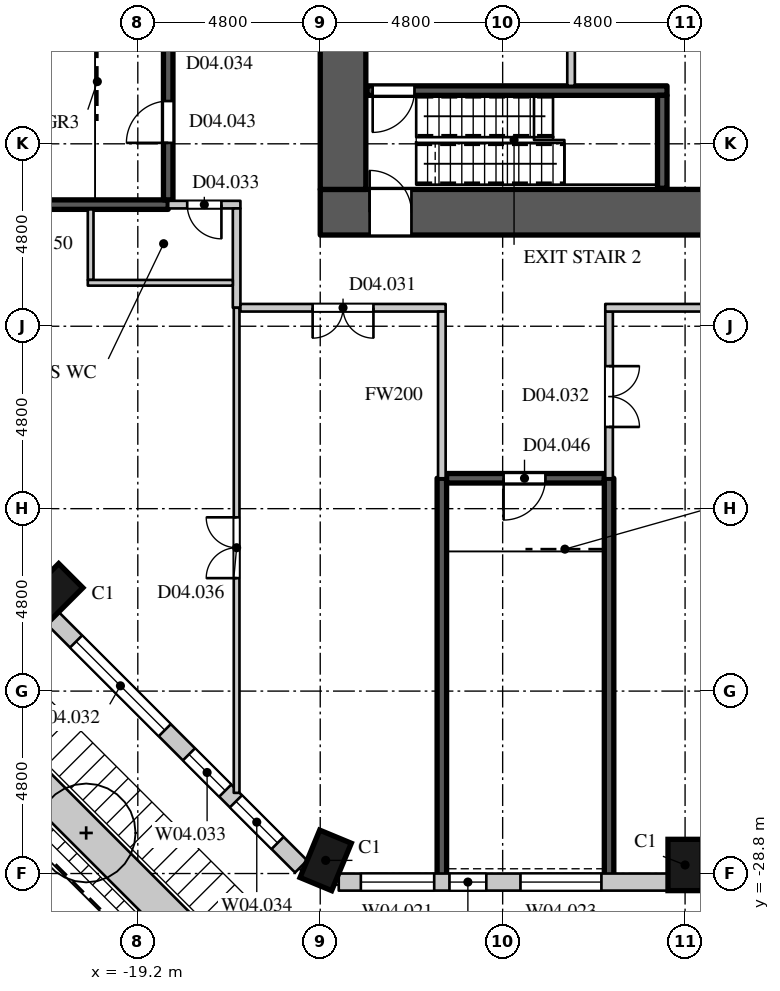
"""IFC4 building model, lengths in metres.
Left out: names, types, materials, properties, quantities, classifications, styles, units other than length and angle.
Written with IfcOpenShell. Run it as: python <this file> out.ifc"""

import sys

from ifc_helpers import new_model, si_unit, direction, frame, frame_2d, origin, origin_2d, place, context, subcontext, project, spatial, rectangle, extrude, element, fill, save


model = new_model("IFC4")
c1 = context("Model", 3, precision=1e-05, world=origin(), true_north=direction((0.0, 1.0)))
c2 = subcontext(c1, "Body", "Model", "MODEL_VIEW")
j1 = project(units=[si_unit("LENGTHUNIT", "METRE"), si_unit("PLANEANGLEUNIT", "RADIAN")], contexts=[c1])
p1 = place(None, origin())
s1 = spatial("IfcSite", under=j1, at=p1, CompositionType="ELEMENT")
p2 = place(p1, origin())
s2 = spatial("IfcBuilding", under=s1, at=p2, CompositionType="ELEMENT")
p3 = place(p2, frame((0.0, 0.0, 21.0)))
s3 = spatial("IfcBuildingStorey", under=s2, at=p3, CompositionType="ELEMENT", Elevation=21.0)
for number, where, z_axis, x_axis in (
    (1, (-21.441, -21.441, 0.0), (0.0, 0.0, 1.0), (0.707, -0.707, 0.0)),
    (2, (-14.257, -28.454, 0.0), (0.0, 0.0, 1.0), (0.924, -0.383, 0.0)),
    (3, (-4.8, -28.575, 0.0), (0.0, 0.0, 1.0), (1.0, 0.0, 0.0)),
):
    element("IfcColumn", number, at=place(p3, frame(where, z_axis=z_axis, x_axis=x_axis)), inside=s3, PredefinedType="COLUMN", context=c2, shape_type="SweptSolid", body=[
        extrude(rectangle(XDim=0.9, YDim=1.35, at=origin_2d()), origin(), (0.0, 0.0, 1.0), 4.5),
    ])
p4 = place(p3, frame((-21.441, -22.077, 0.9), z_axis=(0.0, 0.0, 1.0), x_axis=(0.707106781187, -0.707106781187, 0.0)))
e4 = element("IfcWall", 4, at=p4, inside=s3, PredefinedType="ELEMENTEDWALL", context=c2, shape_type="SweptSolid", body=[
    extrude(rectangle(XDim=9.245, YDim=0.45, at=frame_2d((4.623, 0.0))), origin(), (0.0, 0.0, 1.0), 3.3),
])
p5 = place(p4, frame((0.873, 0.0, 0.15)))
e5 = element("IfcOpeningElement", 5, at=p5, cuts=e4, PredefinedType="OPENING", context=c2, shape_type="SweptSolid", body=[
    extrude(rectangle(XDim=3.3, YDim=2.7, at=frame_2d((1.65, 1.35))), frame((0.0, 0.235, 0.0), z_axis=(0.0, -1.0, 0.0), x_axis=(1.0, 0.0, 0.0)), (0.0, 0.0, 1.0), 0.47),
])
p6 = place(p4, frame((5.073, 0.0, 0.15)))
e6 = element("IfcOpeningElement", 6, at=p6, cuts=e4, PredefinedType="OPENING", context=c2, shape_type="SweptSolid", body=[
    extrude(rectangle(XDim=1.35, YDim=2.7, at=frame_2d((0.675, 1.35))), frame((0.0, 0.235, 0.0), z_axis=(0.0, -1.0, 0.0), x_axis=(1.0, 0.0, 0.0)), (0.0, 0.0, 1.0), 0.47),
])
p7 = place(p4, frame((6.821, 0.0, 0.15)))
e7 = element("IfcOpeningElement", 7, at=p7, cuts=e4, PredefinedType="OPENING", context=c2, shape_type="SweptSolid", body=[
    extrude(rectangle(XDim=1.55, YDim=2.7, at=frame_2d((0.775, 1.35))), frame((0.0, 0.235, 0.0), z_axis=(0.0, -1.0, 0.0), x_axis=(1.0, 0.0, 0.0)), (0.0, 0.0, 1.0), 0.47),
])
p8 = place(p3, frame((-13.913, -29.025, 0.9), z_axis=(0.0, 0.0, 1.0), x_axis=(1.0, 0.0, 0.0)))
e8 = element("IfcWall", 8, at=p8, inside=s3, PredefinedType="ELEMENTEDWALL", context=c2, shape_type="SweptSolid", body=[
    extrude(rectangle(XDim=8.663, YDim=0.45, at=frame_2d((4.332, 0.0))), origin(), (0.0, 0.0, 1.0), 3.3),
])
p9 = place(p8, frame((0.582, 0.0, 0.15)))
e9 = element("IfcOpeningElement", 9, at=p9, cuts=e8, PredefinedType="OPENING", context=c2, shape_type="SweptSolid", body=[
    extrude(rectangle(XDim=1.93, YDim=2.7, at=frame_2d((0.965, 1.35))), frame((0.0, 0.235, 0.0), z_axis=(0.0, -1.0, 0.0), x_axis=(1.0, 0.0, 0.0)), (0.0, 0.0, 1.0), 0.47),
])
p10 = place(p8, frame((2.913, 0.0, 0.15)))
e10 = element("IfcOpeningElement", 10, at=p10, cuts=e8, PredefinedType="OPENING", context=c2, shape_type="SweptSolid", body=[
    extrude(rectangle(XDim=0.97, YDim=2.7, at=frame_2d((0.485, 1.35))), frame((0.0, 0.235, 0.0), z_axis=(0.0, -1.0, 0.0), x_axis=(1.0, 0.0, 0.0)), (0.0, 0.0, 1.0), 0.47),
])
p11 = place(p8, frame((4.781, 0.0, 0.15)))
e11 = element("IfcOpeningElement", 11, at=p11, cuts=e8, PredefinedType="OPENING", context=c2, shape_type="SweptSolid", body=[
    extrude(rectangle(XDim=2.13, YDim=2.7, at=frame_2d((1.065, 1.35))), frame((0.0, 0.235, 0.0), z_axis=(0.0, -1.0, 0.0), x_axis=(1.0, 0.0, 0.0)), (0.0, 0.0, 1.0), 0.47),
])
p12 = place(p3, frame((-23.191, -25.1, 0.0), z_axis=(0.0, 0.0, 1.0), x_axis=(0.707090385078, -0.707123176915, 0.0)))
e12 = element("IfcWall", 12, at=p12, inside=s3, PredefinedType="USERDEFINED", context=c2, shape_type="SweptSolid", body=[
    extrude(rectangle(XDim=7.445, YDim=0.9, at=frame_2d((3.723, 0.0))), origin(), (0.0, 0.0, 1.0), 0.9),
])
p13 = place(p3, frame((-14.4, -11.4, 0.0), z_axis=(0.0, 0.0, 1.0), x_axis=(1.0, 0.0, 0.0)))
e13 = element("IfcWall", 13, at=p13, inside=s3, PredefinedType="SHEAR", context=c2, shape_type="SweptSolid", body=[
    extrude(rectangle(XDim=28.8, YDim=1.2, at=frame_2d((14.4, 0.0))), origin(), (0.0, 0.0, 1.0), 4.5),
])
p14 = place(p13, frame((1.3, 0.0, 0.0)))
e14 = element("IfcOpeningElement", 14, at=p14, cuts=e13, PredefinedType="OPENING", context=c2, shape_type="SweptSolid", body=[
    extrude(rectangle(XDim=1.1, YDim=2.2, at=frame_2d((0.55, 1.1))), frame((0.0, 0.61, 0.0), z_axis=(0.0, -1.0, 0.0), x_axis=(1.0, 0.0, 0.0)), (0.0, 0.0, 1.0), 1.22),
])
p15 = place(p13, frame((26.4, 0.0, 0.0)))
e15 = element("IfcOpeningElement", 15, at=p15, cuts=e13, PredefinedType="OPENING", context=c2, shape_type="SweptSolid", body=[
    extrude(rectangle(XDim=1.1, YDim=2.2, at=frame_2d((0.55, 1.1))), frame((0.0, 0.61, 0.0), z_axis=(0.0, -1.0, 0.0), x_axis=(1.0, 0.0, 0.0)), (0.0, 0.0, 1.0), 1.22),
])
p16 = place(p3, frame((-13.8, -10.8, 0.0), z_axis=(0.0, 0.0, 1.0), x_axis=(0.0, 1.0, 0.0)))
e16 = element("IfcWall", 16, at=p16, inside=s3, PredefinedType="SHEAR", context=c2, shape_type="SweptSolid", body=[
    extrude(rectangle(XDim=21.6, YDim=1.2, at=frame_2d((10.8, 0.0))), origin(), (0.0, 0.0, 1.0), 4.5),
])
p17 = place(p16, frame((15.5, 0.0, 0.0)))
e17 = element("IfcOpeningElement", 17, at=p17, cuts=e16, PredefinedType="OPENING", context=c2, shape_type="SweptSolid", body=[
    extrude(rectangle(XDim=1.5, YDim=2.4, at=frame_2d((0.75, 1.2))), frame((0.0, 0.61, 0.0), z_axis=(0.0, -1.0, 0.0), x_axis=(1.0, 0.0, 0.0)), (0.0, 0.0, 1.0), 1.22),
])
p18 = place(p16, frame((4.5, 0.0, 0.0)))
e18 = element("IfcOpeningElement", 18, at=p18, cuts=e16, PredefinedType="OPENING", context=c2, shape_type="SweptSolid", body=[
    extrude(rectangle(XDim=1.5, YDim=2.4, at=frame_2d((0.75, 1.2))), frame((0.0, 0.61, 0.0), z_axis=(0.0, -1.0, 0.0), x_axis=(1.0, 0.0, 0.0)), (0.0, 0.0, 1.0), 1.22),
])
p19 = place(p3, frame((-18.4, -11.2, 0.0), z_axis=(0.0, 0.0, 1.0), x_axis=(1.0, 0.0, 0.0)))
e19 = element("IfcWall", 19, at=p19, inside=s3, PredefinedType="PARTITIONING", context=c2, shape_type="SweptSolid", body=[
    extrude(rectangle(XDim=1.9, YDim=0.2, at=frame_2d((0.95, 0.0))), origin(), (0.0, 0.0, 1.0), 3.55),
])
p20 = place(p19, frame((0.5, 0.0, 0.0)))
e20 = element("IfcOpeningElement", 20, at=p20, cuts=e19, PredefinedType="OPENING", context=c2, shape_type="SweptSolid", body=[
    extrude(rectangle(XDim=0.9, YDim=2.2, at=frame_2d((0.45, 1.1))), frame((0.0, 0.11, 0.0), z_axis=(0.0, -1.0, 0.0), x_axis=(1.0, 0.0, 0.0)), (0.0, 0.0, 1.0), 0.22),
])
p21 = place(p3, frame((-16.6, -13.914, 0.0), z_axis=(0.0, 0.0, 1.0), x_axis=(0.0, 1.0, 0.0)))
e21 = element("IfcWall", 21, at=p21, inside=s3, PredefinedType="PARTITIONING", context=c2, shape_type="SweptSolid", body=[
    extrude(rectangle(XDim=2.614, YDim=0.2, at=frame_2d((1.307, 0.0))), origin(), (0.0, 0.0, 1.0), 4.25),
])
p22 = place(p3, frame((-16.5, -13.914, 0.0), z_axis=(0.0, 0.0, 1.0), x_axis=(1.0, 0.0, 0.0)))
e22 = element("IfcWall", 22, at=p22, inside=s3, PredefinedType="PARTITIONING", context=c2, shape_type="SweptSolid", body=[
    extrude(rectangle(XDim=5.4, YDim=0.2, at=frame_2d((2.7, 0.0))), origin(), (0.0, 0.0, 1.0), 4.25),
])
p23 = place(p22, frame((1.9, 0.0, 0.0)))
e23 = element("IfcOpeningElement", 23, at=p23, cuts=e22, PredefinedType="OPENING", context=c2, shape_type="SweptSolid", body=[
    extrude(rectangle(XDim=1.6, YDim=2.4, at=frame_2d((0.8, 1.2))), frame((0.0, 0.11, 0.0), z_axis=(0.0, -1.0, 0.0), x_axis=(1.0, 0.0, 0.0)), (0.0, 0.0, 1.0), 0.22),
])
p24 = place(p3, frame((-11.2, -18.4, 0.0), z_axis=(0.0, 0.0, 1.0), x_axis=(0.0, 1.0, 0.0)))
e24 = element("IfcWall", 24, at=p24, inside=s3, PredefinedType="PARTITIONING", context=c2, shape_type="SweptSolid", body=[
    extrude(rectangle(XDim=4.386, YDim=0.2, at=frame_2d((2.193, 0.0))), origin(), (0.0, 0.0, 1.0), 4.25),
])
p25 = place(p3, frame((-6.8, -18.4, 0.0), z_axis=(0.0, 0.0, 1.0), x_axis=(0.0, 1.0, 0.0)))
e25 = element("IfcWall", 25, at=p25, inside=s3, PredefinedType="PARTITIONING", context=c2, shape_type="SweptSolid", body=[
    extrude(rectangle(XDim=4.386, YDim=0.2, at=frame_2d((2.193, 0.0))), origin(), (0.0, 0.0, 1.0), 4.25),
])
p26 = place(p25, frame((1.35, 0.0, 0.0)))
e26 = element("IfcOpeningElement", 26, at=p26, cuts=e25, PredefinedType="OPENING", context=c2, shape_type="SweptSolid", body=[
    extrude(rectangle(XDim=1.6, YDim=2.4, at=frame_2d((0.8, 1.2))), frame((0.0, 0.11, 0.0), z_axis=(0.0, -1.0, 0.0), x_axis=(1.0, 0.0, 0.0)), (0.0, 0.0, 1.0), 0.22),
])
p27 = place(p3, frame((-6.9, -13.914, 0.0), z_axis=(0.0, 0.0, 1.0), x_axis=(1.0, 0.0, 0.0)))
e27 = element("IfcWall", 27, at=p27, inside=s3, PredefinedType="PARTITIONING", context=c2, shape_type="SweptSolid", body=[
    extrude(rectangle(XDim=13.8, YDim=0.2, at=frame_2d((6.9, 0.0))), origin(), (0.0, 0.0, 1.0), 4.25),
])
p28 = place(p3, frame((-20.441, -13.182, 0.0), z_axis=(0.0, 0.0, 1.0), x_axis=(0.0, 1.0, 0.0)))
e28 = element("IfcWall", 28, at=p28, inside=s3, PredefinedType="PARTITIONING", context=c2, shape_type="SweptSolid", body=[
    extrude(rectangle(XDim=1.857, YDim=0.15, at=frame_2d((0.928, 0.0))), origin(), (0.0, 0.0, 1.0), 4.25),
])
p29 = place(p3, frame((-20.516, -13.257, 0.0), z_axis=(0.0, 0.0, 1.0), x_axis=(1.0, 0.0, 0.0)))
e29 = element("IfcWall", 29, at=p29, inside=s3, PredefinedType="PARTITIONING", context=c2, shape_type="SweptSolid", body=[
    extrude(rectangle(XDim=3.816, YDim=0.15, at=frame_2d((1.908, 0.0))), origin(), (0.0, 0.0, 1.0), 4.25),
])
p30 = place(p3, frame((-16.6, -26.678, 0.0), z_axis=(0.0, 0.0, 1.0), x_axis=(0.0, 1.0, 0.0)))
e30 = element("IfcWall", 30, at=p30, inside=s3, PredefinedType="PARTITIONING", context=c2, shape_type="SweptSolid", body=[
    extrude(rectangle(XDim=12.764, YDim=0.15, at=frame_2d((6.382, 0.0))), origin(), (0.0, 0.0, 1.0), 4.25),
])
p31 = place(p30, frame((5.65, 0.0, 0.0)))
e31 = element("IfcOpeningElement", 31, at=p31, cuts=e30, PredefinedType="OPENING", context=c2, shape_type="SweptSolid", body=[
    extrude(rectangle(XDim=1.6, YDim=2.4, at=frame_2d((0.8, 1.2))), frame((0.0, 0.085, 0.0), z_axis=(0.0, -1.0, 0.0), x_axis=(1.0, 0.0, 0.0)), (0.0, 0.0, 1.0), 0.17),
])
p32 = place(p3, frame((-7.8, -8.075, 0.0), z_axis=(0.0, 0.0, 1.0), x_axis=(0.0, 1.0, 0.0)))
e32 = element("IfcWall", 32, at=p32, inside=s3, PredefinedType="PARTITIONING", context=c2, shape_type="SweptSolid", body=[
    extrude(rectangle(XDim=2.275, YDim=0.2, at=frame_2d((1.137, 0.0))), origin(), (0.0, 0.0, 1.0), 4.25),
])
p33 = place(p3, frame((-28.855, -11.2, 0.0), z_axis=(0.0, 0.0, 1.0), x_axis=(1.0, 0.0, 0.0)))
e33 = element("IfcWall", 33, at=p33, inside=s3, PredefinedType="SHEAR", context=c2, shape_type="SweptSolid", body=[
    extrude(rectangle(XDim=10.455, YDim=0.25, at=frame_2d((5.228, 0.0))), origin(), (0.0, 0.0, 1.0), 4.25),
])
p34 = place(p3, frame((-18.4, -11.075, 0.0), z_axis=(0.0, 0.0, 1.0), x_axis=(0.0, 1.0, 0.0)))
e34 = element("IfcWall", 34, at=p34, inside=s3, PredefinedType="SHEAR", context=c2, shape_type="SweptSolid", body=[
    extrude(rectangle(XDim=4.15, YDim=0.25, at=frame_2d((2.075, 0.0))), origin(), (0.0, 0.0, 1.0), 4.25),
])
p35 = place(p34, frame((1.5, 0.0, 0.0)))
e35 = element("IfcOpeningElement", 35, at=p35, cuts=e34, PredefinedType="OPENING", context=c2, shape_type="SweptSolid", body=[
    extrude(rectangle(XDim=1.1, YDim=2.2, at=frame_2d((0.55, 1.1))), frame((0.0, 0.135, 0.0), z_axis=(0.0, -1.0, 0.0), x_axis=(1.0, 0.0, 0.0)), (0.0, 0.0, 1.0), 0.27),
])
p36 = place(p3, frame((-13.17, -8.2, 0.0), z_axis=(0.0, 0.0, 1.0), x_axis=(1.0, 0.0, 0.0)))
e36 = element("IfcWall", 36, at=p36, inside=s3, PredefinedType="SHEAR", context=c2, shape_type="SweptSolid", body=[
    extrude(rectangle(XDim=7.895, YDim=0.25, at=frame_2d((3.948, 0.0))), origin(), (0.0, 0.0, 1.0), 4.25),
])
p37 = place(p36, frame((0.15, 0.0, 0.0)))
e37 = element("IfcOpeningElement", 37, at=p37, cuts=e36, PredefinedType="OPENING", context=c2, shape_type="SweptSolid", body=[
    extrude(rectangle(XDim=1.1, YDim=2.2, at=frame_2d((0.55, 1.1))), frame((0.0, 0.135, 0.0), z_axis=(0.0, -1.0, 0.0), x_axis=(1.0, 0.0, 0.0)), (0.0, 0.0, 1.0), 0.27),
])
p38 = place(p3, frame((-11.2, -28.855, 0.0), z_axis=(0.0, 0.0, 1.0), x_axis=(0.0, 1.0, 0.0)))
e38 = element("IfcWall", 38, at=p38, inside=s3, PredefinedType="SHEAR", context=c2, shape_type="SweptSolid", body=[
    extrude(rectangle(XDim=10.455, YDim=0.25, at=frame_2d((5.228, 0.0))), origin(), (0.0, 0.0, 1.0), 4.25),
])
p39 = place(p3, frame((-11.075, -18.4, 0.0), z_axis=(0.0, 0.0, 1.0), x_axis=(1.0, 0.0, 0.0)))
e39 = element("IfcWall", 39, at=p39, inside=s3, PredefinedType="SHEAR", context=c2, shape_type="SweptSolid", body=[
    extrude(rectangle(XDim=4.15, YDim=0.25, at=frame_2d((2.075, 0.0))), origin(), (0.0, 0.0, 1.0), 4.25),
])
p40 = place(p39, frame((1.5, 0.0, 0.0)))
e40 = element("IfcOpeningElement", 40, at=p40, cuts=e39, PredefinedType="OPENING", context=c2, shape_type="SweptSolid", body=[
    extrude(rectangle(XDim=1.1, YDim=2.2, at=frame_2d((0.55, 1.1))), frame((0.0, 0.135, 0.0), z_axis=(0.0, -1.0, 0.0), x_axis=(1.0, 0.0, 0.0)), (0.0, 0.0, 1.0), 0.27),
])
p41 = place(p3, frame((-6.8, -28.855, 0.0), z_axis=(0.0, 0.0, 1.0), x_axis=(0.0, 1.0, 0.0)))
e41 = element("IfcWall", 41, at=p41, inside=s3, PredefinedType="SHEAR", context=c2, shape_type="SweptSolid", body=[
    extrude(rectangle(XDim=10.455, YDim=0.25, at=frame_2d((5.228, 0.0))), origin(), (0.0, 0.0, 1.0), 4.25),
])
p42 = place(p3, frame((-5.4, -10.77, 0.0), z_axis=(0.0, 0.0, 1.0), x_axis=(0.0, 1.0, 0.0)))
e42 = element("IfcWall", 42, at=p42, inside=s3, PredefinedType="SHEAR", context=c2, shape_type="SweptSolid", body=[
    extrude(rectangle(XDim=2.445, YDim=0.25, at=frame_2d((1.223, 0.0))), origin(), (0.0, 0.0, 1.0), 4.25),
])
p43 = place(p5, origin())
e43 = element("IfcWindow", 43, at=p43, inside=s3, PartitioningType="SINGLE_PANEL", PredefinedType="WINDOW", context=c2, shape_type="SweptSolid", body=[
    extrude(rectangle(XDim=3.3, YDim=2.7, at=frame_2d((1.65, 1.35))), frame((0.0, 0.135, 0.0), z_axis=(0.0, -1.0, 0.0), x_axis=(1.0, 0.0, 0.0)), (0.0, 0.0, 1.0), 0.06),
])
fill(e5, e43)
p44 = place(p6, origin())
e44 = element("IfcWindow", 44, at=p44, inside=s3, PartitioningType="SINGLE_PANEL", PredefinedType="WINDOW", context=c2, shape_type="SweptSolid", body=[
    extrude(rectangle(XDim=1.35, YDim=2.7, at=frame_2d((0.675, 1.35))), frame((0.0, 0.135, 0.0), z_axis=(0.0, -1.0, 0.0), x_axis=(1.0, 0.0, 0.0)), (0.0, 0.0, 1.0), 0.06),
])
fill(e6, e44)
p45 = place(p7, origin())
e45 = element("IfcWindow", 45, at=p45, inside=s3, PartitioningType="SINGLE_PANEL", PredefinedType="WINDOW", context=c2, shape_type="SweptSolid", body=[
    extrude(rectangle(XDim=1.55, YDim=2.7, at=frame_2d((0.775, 1.35))), frame((0.0, 0.135, 0.0), z_axis=(0.0, -1.0, 0.0), x_axis=(1.0, 0.0, 0.0)), (0.0, 0.0, 1.0), 0.06),
])
fill(e7, e45)
p46 = place(p9, origin())
e46 = element("IfcWindow", 46, at=p46, inside=s3, PartitioningType="SINGLE_PANEL", PredefinedType="WINDOW", context=c2, shape_type="SweptSolid", body=[
    extrude(rectangle(XDim=1.93, YDim=2.7, at=frame_2d((0.965, 1.35))), frame((0.0, 0.135, 0.0), z_axis=(0.0, -1.0, 0.0), x_axis=(1.0, 0.0, 0.0)), (0.0, 0.0, 1.0), 0.06),
])
fill(e9, e46)
p47 = place(p10, origin())
e47 = element("IfcWindow", 47, at=p47, inside=s3, PartitioningType="SINGLE_PANEL", PredefinedType="WINDOW", context=c2, shape_type="SweptSolid", body=[
    extrude(rectangle(XDim=0.97, YDim=2.7, at=frame_2d((0.485, 1.35))), frame((0.0, 0.135, 0.0), z_axis=(0.0, -1.0, 0.0), x_axis=(1.0, 0.0, 0.0)), (0.0, 0.0, 1.0), 0.06),
])
fill(e10, e47)
p48 = place(p11, origin())
e48 = element("IfcWindow", 48, at=p48, inside=s3, PartitioningType="SINGLE_PANEL", PredefinedType="WINDOW", context=c2, shape_type="SweptSolid", body=[
    extrude(rectangle(XDim=2.13, YDim=2.7, at=frame_2d((1.065, 1.35))), frame((0.0, 0.135, 0.0), z_axis=(0.0, -1.0, 0.0), x_axis=(1.0, 0.0, 0.0)), (0.0, 0.0, 1.0), 0.06),
])
fill(e11, e48)
p49 = place(p37, origin())
e49 = element("IfcDoor", 49, at=p49, inside=s3, OperationType="SINGLE_SWING_RIGHT", PredefinedType="DOOR", context=c2, shape_type="SweptSolid", body=[
    extrude(rectangle(XDim=1.1, YDim=2.2, at=frame_2d((0.55, 1.1))), frame((0.0, 0.025, 0.0), z_axis=(0.0, -1.0, 0.0), x_axis=(1.0, 0.0, 0.0)), (0.0, 0.0, 1.0), 0.05),
])
fill(e37, e49)
p50 = place(p23, origin())
e50 = element("IfcDoor", 50, at=p50, inside=s3, OperationType="DOUBLE_DOOR_SINGLE_SWING", PredefinedType="DOOR", context=c2, shape_type="SweptSolid", body=[
    extrude(rectangle(XDim=1.6, YDim=2.4, at=frame_2d((0.8, 1.2))), frame((0.0, 0.025, 0.0), z_axis=(0.0, -1.0, 0.0), x_axis=(1.0, 0.0, 0.0)), (0.0, 0.0, 1.0), 0.05),
])
fill(e23, e50)
p51 = place(p26, origin())
e51 = element("IfcDoor", 51, at=p51, inside=s3, OperationType="DOUBLE_DOOR_SINGLE_SWING", PredefinedType="DOOR", context=c2, shape_type="SweptSolid", body=[
    extrude(rectangle(XDim=1.6, YDim=2.4, at=frame_2d((0.8, 1.2))), frame((0.0, 0.025, 0.0), z_axis=(0.0, -1.0, 0.0), x_axis=(1.0, 0.0, 0.0)), (0.0, 0.0, 1.0), 0.05),
])
fill(e26, e51)
p52 = place(p20, origin())
e52 = element("IfcDoor", 52, at=p52, inside=s3, OperationType="SINGLE_SWING_LEFT", PredefinedType="DOOR", context=c2, shape_type="SweptSolid", body=[
    extrude(rectangle(XDim=0.9, YDim=2.2, at=frame_2d((0.45, 1.1))), frame((0.0, 0.025, 0.0), z_axis=(0.0, -1.0, 0.0), x_axis=(1.0, 0.0, 0.0)), (0.0, 0.0, 1.0), 0.05),
])
fill(e20, e52)
p53 = place(p31, origin())
e53 = element("IfcDoor", 53, at=p53, inside=s3, OperationType="DOUBLE_DOOR_SINGLE_SWING", PredefinedType="DOOR", context=c2, shape_type="SweptSolid", body=[
    extrude(rectangle(XDim=1.6, YDim=2.4, at=frame_2d((0.8, 1.2))), frame((0.0, 0.025, 0.0), z_axis=(0.0, -1.0, 0.0), x_axis=(1.0, 0.0, 0.0)), (0.0, 0.0, 1.0), 0.05),
])
fill(e31, e53)
p54 = place(p35, origin())
e54 = element("IfcDoor", 54, at=p54, inside=s3, OperationType="SINGLE_SWING_LEFT", PredefinedType="DOOR", context=c2, shape_type="SweptSolid", body=[
    extrude(rectangle(XDim=1.1, YDim=2.2, at=frame_2d((0.55, 1.1))), frame((0.0, 0.025, 0.0), z_axis=(0.0, -1.0, 0.0), x_axis=(1.0, 0.0, 0.0)), (0.0, 0.0, 1.0), 0.05),
])
fill(e35, e54)
p55 = place(p40, origin())
e55 = element("IfcDoor", 55, at=p55, inside=s3, OperationType="SINGLE_SWING_RIGHT", PredefinedType="DOOR", context=c2, shape_type="SweptSolid", body=[
    extrude(rectangle(XDim=1.1, YDim=2.2, at=frame_2d((0.55, 1.1))), frame((0.0, 0.025, 0.0), z_axis=(0.0, -1.0, 0.0), x_axis=(1.0, 0.0, 0.0)), (0.0, 0.0, 1.0), 0.05),
])
fill(e40, e55)
p56 = place(p14, origin())
e56 = element("IfcDoor", 56, at=p56, inside=s3, OperationType="SINGLE_SWING_LEFT", PredefinedType="DOOR", context=c2, shape_type="SweptSolid", body=[
    extrude(rectangle(XDim=1.1, YDim=2.2, at=frame_2d((0.55, 1.1))), frame((0.0, 0.025, 0.0), z_axis=(0.0, -1.0, 0.0), x_axis=(1.0, 0.0, 0.0)), (0.0, 0.0, 1.0), 0.05),
])
fill(e14, e56)
save(model, sys.argv[1])
